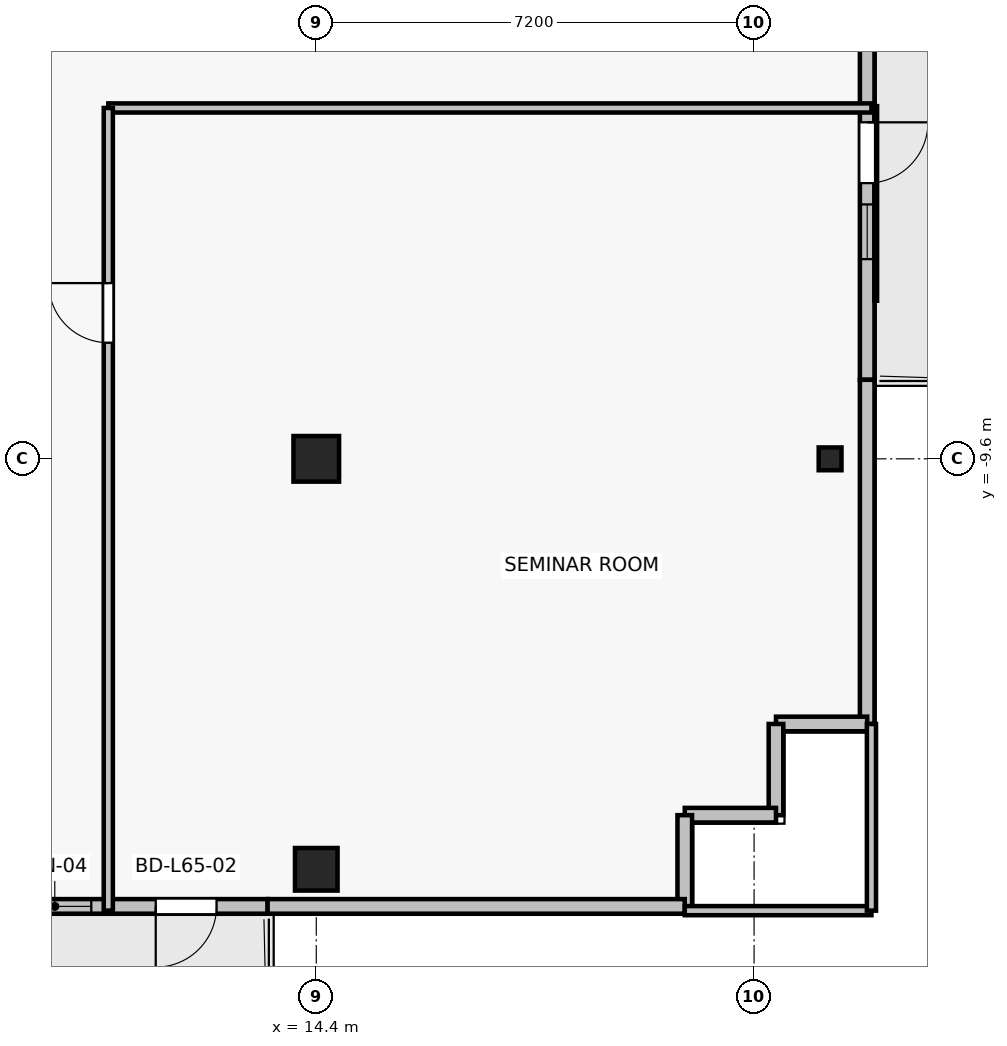
"""IFC4 building model, lengths in metres.
Left out: names, types, materials, properties, quantities, classifications, styles, units other than length and angle.
Written with IfcOpenShell. Run it as: python <this file> out.ifc"""

import sys

from ifc_helpers import new_model, si_unit, direction, frame, frame_2d, origin, origin_2d, place, context, subcontext, project, spatial, rectangle, i_section, extrude, source, transform, mapped, element, fill, save


model = new_model("IFC4")
c1 = context("Model", 3, precision=1e-05, world=origin(), true_north=direction((0.0, 1.0)))
c2 = subcontext(c1, "Body", "Model", "MODEL_VIEW")
j1 = project(units=[si_unit("LENGTHUNIT", "METRE"), si_unit("PLANEANGLEUNIT", "RADIAN")], contexts=[c1])
p1 = place(None, origin())
s1 = spatial("IfcSite", under=j1, at=p1, CompositionType="ELEMENT")
p2 = place(p1, origin())
s2 = spatial("IfcBuilding", under=s1, at=p2, CompositionType="ELEMENT")
p3 = place(p2, frame((0.0, 0.0, 232.0)))
s3 = spatial("IfcBuildingStorey", under=s2, at=p3, CompositionType="ELEMENT", Elevation=232.0)
p4 = place(p3, frame((14.4, -9.6, 0.0), z_axis=(0.0, 0.0, 1.0), x_axis=(1.0, 0.0, 0.0)))
e1 = element("IfcColumn", 1, at=p4, inside=s3, PredefinedType="COLUMN", context=c2, shape_type="SweptSolid", body=[
    extrude(rectangle(XDim=0.75, YDim=0.75, at=origin_2d()), origin(), (0.0, 0.0, 1.0), 3.3),
])
p5 = place(p3, frame((14.4, -16.35, 0.0), z_axis=(0.0, 0.0, 1.0), x_axis=(1.0, 0.0, 0.0)))
e2 = element("IfcColumn", 2, at=p5, inside=s3, PredefinedType="COLUMN", context=c2, shape_type="SweptSolid", body=[
    extrude(rectangle(XDim=0.7, YDim=0.7, at=origin_2d()), origin(), (0.0, 0.0, 1.0), 3.3),
])
p6 = place(p3, frame((22.85, -9.6, 0.0), z_axis=(0.0, 0.0, 1.0), x_axis=(1.0, 0.0, 0.0)))
e3 = element("IfcColumn", 3, at=p6, inside=s3, PredefinedType="COLUMN", context=c2, shape_type="SweptSolid", body=[
    extrude(i_section(OverallWidth=0.375, OverallDepth=0.375, WebThickness=0.017, FlangeThickness=0.027, FilletRadius=0.015, at=origin_2d()), origin(), (0.0, 0.0, 1.0), 3.3),
])
p7 = place(p3, frame((13.6, -16.96, 0.0), z_axis=(0.0, 0.0, 1.0), x_axis=(-1.0, 0.0, 0.0)))
e4 = element("IfcWall", 4, at=p7, inside=s3, PredefinedType="SOLIDWALL", context=c2, shape_type="SweptSolid", body=[
    extrude(rectangle(XDim=7.0, YDim=0.24, at=frame_2d((3.5, 0.0))), origin(), (0.0, 0.0, 1.0), 2.665),
])
p8 = place(p7, frame((0.84, 0.0, 0.0)))
e5 = element("IfcOpeningElement", 5, at=p8, cuts=e4, PredefinedType="OPENING", context=c2, shape_type="SweptSolid", body=[
    extrude(rectangle(XDim=1.0, YDim=2.2, at=frame_2d((0.5, 1.1))), frame((0.0, 0.13, 0.0), z_axis=(0.0, -1.0, 0.0), x_axis=(1.0, 0.0, 0.0)), (0.0, 0.0, 1.0), 0.26),
])
p9 = place(p7, frame((2.9, 0.0, 0.85)))
e6 = element("IfcOpeningElement", 6, at=p9, cuts=e4, PredefinedType="OPENING", context=c2, shape_type="SweptSolid", body=[
    extrude(rectangle(XDim=1.2, YDim=1.5, at=frame_2d((0.6, 0.75))), frame((0.0, 0.13, 0.0), z_axis=(0.0, -1.0, 0.0), x_axis=(1.0, 0.0, 0.0)), (0.0, 0.0, 1.0), 0.26),
])
p10 = place(p3, frame((23.46, -2.5, 0.0), z_axis=(0.0, 0.0, 1.0), x_axis=(0.0, -1.0, 0.0)))
e7 = element("IfcWall", 7, at=p10, inside=s3, PredefinedType="SOLIDWALL", context=c2, shape_type="SweptSolid", body=[
    extrude(rectangle(XDim=5.8, YDim=0.24, at=frame_2d((2.9, 0.0))), origin(), (0.0, 0.0, 1.0), 3.075),
])
p11 = place(p10, frame((1.566, 0.0, 0.0)))
e8 = element("IfcOpeningElement", 8, at=p11, cuts=e7, PredefinedType="OPENING", context=c2, shape_type="SweptSolid", body=[
    extrude(rectangle(XDim=1.0, YDim=2.2, at=frame_2d((0.5, 1.1))), frame((0.0, 0.13, 0.0), z_axis=(0.0, -1.0, 0.0), x_axis=(1.0, 0.0, 0.0)), (0.0, 0.0, 1.0), 0.26),
])
p12 = place(p10, frame((2.916, 0.0, 0.85)))
e9 = element("IfcOpeningElement", 9, at=p12, cuts=e7, PredefinedType="OPENING", context=c2, shape_type="SweptSolid", body=[
    extrude(rectangle(XDim=0.9, YDim=1.35, at=frame_2d((0.45, 0.675))), frame((0.0, 0.13, 0.0), z_axis=(0.0, -1.0, 0.0), x_axis=(1.0, 0.0, 0.0)), (0.0, 0.0, 1.0), 0.26),
])
p13 = place(p3, frame((23.46, -13.96, 0.0), z_axis=(0.0, 0.0, 1.0), x_axis=(0.0, 1.0, 0.0)))
e10 = element("IfcWall", 10, at=p13, inside=s3, PredefinedType="SOLIDWALL", context=c2, shape_type="SweptSolid", body=[
    extrude(rectangle(XDim=5.66, YDim=0.24, at=frame_2d((2.83, 0.0))), origin(), (0.0, 0.0, 1.0), 3.075),
])
for number, where, z_axis, x_axis in (
    (11, (21.96, -13.96, 0.0), (0.0, 0.0, 1.0), (1.0, 0.0, 0.0)),
    (12, (21.96, -15.46, 0.0), (0.0, 0.0, 1.0), (0.0, 1.0, 0.0)),
    (13, (20.46, -15.46, 0.0), (0.0, 0.0, 1.0), (1.0, 0.0, 0.0)),
    (14, (20.46, -16.96, 0.0), (0.0, 0.0, 1.0), (0.0, 1.0, 0.0)),
):
    element("IfcWall", number, at=place(p3, frame(where, z_axis=z_axis, x_axis=x_axis)), inside=s3, PredefinedType="SOLIDWALL", context=c2, shape_type="SweptSolid", body=[
        extrude(rectangle(XDim=1.5, YDim=0.24, at=frame_2d((0.75, 0.0))), origin(), (0.0, 0.0, 1.0), 3.075),
    ])
p14 = place(p3, frame((13.6, -16.96, 0.0), z_axis=(0.0, 0.0, 1.0), x_axis=(1.0, 0.0, 0.0)))
e15 = element("IfcWall", 15, at=p14, inside=s3, PredefinedType="SOLIDWALL", context=c2, shape_type="SweptSolid", body=[
    extrude(rectangle(XDim=6.86, YDim=0.24, at=frame_2d((3.43, 0.0))), origin(), (0.0, 0.0, 1.0), 2.665),
])
p15 = place(p3, frame((23.53, -17.03, 0.0), z_axis=(0.0, 0.0, 1.0), x_axis=(-1.0, 0.0, 0.0)))
e16 = element("IfcWall", 16, at=p15, inside=s3, PredefinedType="PARTITIONING", context=c2, shape_type="SweptSolid", body=[
    extrude(rectangle(XDim=3.07, YDim=0.15, at=frame_2d((1.535, 0.0))), origin(), (0.0, 0.0, 1.0), 2.665),
])
p16 = place(p3, frame((10.98, -3.83, 0.0), z_axis=(0.0, 0.0, 1.0), x_axis=(1.0, 0.0, 0.0)))
e17 = element("IfcWall", 17, at=p16, inside=s3, PredefinedType="PARTITIONING", context=c2, shape_type="SweptSolid", body=[
    extrude(rectangle(XDim=12.55, YDim=0.15, at=frame_2d((6.275, 0.0))), origin(), (0.0, 0.0, 1.0), 2.615),
])
p17 = place(p3, frame((10.98, -17.03, 0.0), z_axis=(0.0, 0.0, 1.0), x_axis=(0.0, 1.0, 0.0)))
e18 = element("IfcWall", 18, at=p17, inside=s3, PredefinedType="PARTITIONING", context=c2, shape_type="SweptSolid", body=[
    extrude(rectangle(XDim=13.2, YDim=0.15, at=frame_2d((6.6, 0.0))), origin(), (0.0, 0.0, 1.0), 2.615),
])
p18 = place(p17, frame((9.34, 0.0, 0.0)))
e19 = element("IfcOpeningElement", 19, at=p18, cuts=e18, PredefinedType="OPENING", context=c2, shape_type="SweptSolid", body=[
    extrude(rectangle(XDim=0.98, YDim=2.15, at=frame_2d((0.49, 1.075))), frame((0.0, 0.085, 0.0), z_axis=(0.0, -1.0, 0.0), x_axis=(1.0, 0.0, 0.0)), (0.0, 0.0, 1.0), 0.17),
])
p19 = place(p3, frame((23.53, -13.96, 0.0), z_axis=(0.0, 0.0, 1.0), x_axis=(0.0, -1.0, 0.0)))
e20 = element("IfcWall", 20, at=p19, inside=s3, PredefinedType="PARTITIONING", context=c2, shape_type="SweptSolid", body=[
    extrude(rectangle(XDim=3.07, YDim=0.15, at=frame_2d((1.535, 0.0))), origin(), (0.0, 0.0, 1.0), 3.075),
])
m1 = source(origin(), c2, "Body", "SweptSolid", [
    extrude(rectangle(XDim=1.0, YDim=2.2, at=frame_2d((0.5, 1.1))), frame((0.0, 0.025, 0.0), z_axis=(0.0, -1.0, 0.0), x_axis=(1.0, 0.0, 0.0)), (0.0, 0.0, 1.0), 0.05),
])
p20 = place(p8, origin())
e21 = element("IfcDoor", 21, at=p20, inside=s3, OperationType="SINGLE_SWING_RIGHT", PredefinedType="DOOR", context=c2, shape_type="MappedRepresentation", body=[
    mapped(m1, transform((0.0, 0.0, 0.0), x_axis=(1.0, 0.0, 0.0), y_axis=(0.0, 1.0, 0.0), z_axis=(0.0, 0.0, 1.0), scale=1.0)),
])
fill(e5, e21)
m2 = source(origin(), c2, "Body", "SweptSolid", [
    extrude(rectangle(XDim=1.2, YDim=1.5, at=frame_2d((0.6, 0.75))), frame((0.0, 0.03, 0.0), z_axis=(0.0, -1.0, 0.0), x_axis=(1.0, 0.0, 0.0)), (0.0, 0.0, 1.0), 0.06),
])
p21 = place(p9, origin())
e22 = element("IfcWindow", 22, at=p21, inside=s3, PartitioningType="SINGLE_PANEL", PredefinedType="WINDOW", context=c2, shape_type="MappedRepresentation", body=[
    mapped(m2, transform((0.0, 0.0, 0.0), x_axis=(1.0, 0.0, 0.0), y_axis=(0.0, 1.0, 0.0), z_axis=(0.0, 0.0, 1.0), scale=1.0)),
])
fill(e6, e22)
p22 = place(p11, origin())
e23 = element("IfcDoor", 23, at=p22, inside=s3, OperationType="SINGLE_SWING_LEFT", PredefinedType="DOOR", context=c2, shape_type="MappedRepresentation", body=[
    mapped(m1, transform((0.0, 0.0, 0.0), x_axis=(1.0, 0.0, 0.0), y_axis=(0.0, 1.0, 0.0), z_axis=(0.0, 0.0, 1.0), scale=1.0)),
])
fill(e8, e23)
m3 = source(origin(), c2, "Body", "SweptSolid", [
    extrude(rectangle(XDim=0.9, YDim=1.35, at=frame_2d((0.45, 0.675))), frame((0.0, 0.03, 0.0), z_axis=(0.0, -1.0, 0.0), x_axis=(1.0, 0.0, 0.0)), (0.0, 0.0, 1.0), 0.06),
])
p23 = place(p12, origin())
e24 = element("IfcWindow", 24, at=p23, inside=s3, PartitioningType="SINGLE_PANEL", PredefinedType="WINDOW", context=c2, shape_type="MappedRepresentation", body=[
    mapped(m3, transform((0.0, 0.0, 0.0), x_axis=(1.0, 0.0, 0.0), y_axis=(0.0, 1.0, 0.0), z_axis=(0.0, 0.0, 1.0), scale=1.0)),
])
fill(e9, e24)
m4 = source(origin(), c2, "Body", "SweptSolid", [
    extrude(rectangle(XDim=0.98, YDim=2.15, at=frame_2d((0.49, 1.075))), frame((0.0, 0.025, 0.0), z_axis=(0.0, -1.0, 0.0), x_axis=(1.0, 0.0, 0.0)), (0.0, 0.0, 1.0), 0.05),
])
p24 = place(p18, origin())
e25 = element("IfcDoor", 25, at=p24, inside=s3, OperationType="SINGLE_SWING_RIGHT", PredefinedType="DOOR", context=c2, shape_type="MappedRepresentation", body=[
    mapped(m4, transform((0.0, 0.0, 0.0), x_axis=(1.0, 0.0, 0.0), y_axis=(0.0, 1.0, 0.0), z_axis=(0.0, 0.0, 1.0), scale=1.0)),
])
fill(e19, e25)
save(model, sys.argv[1])
